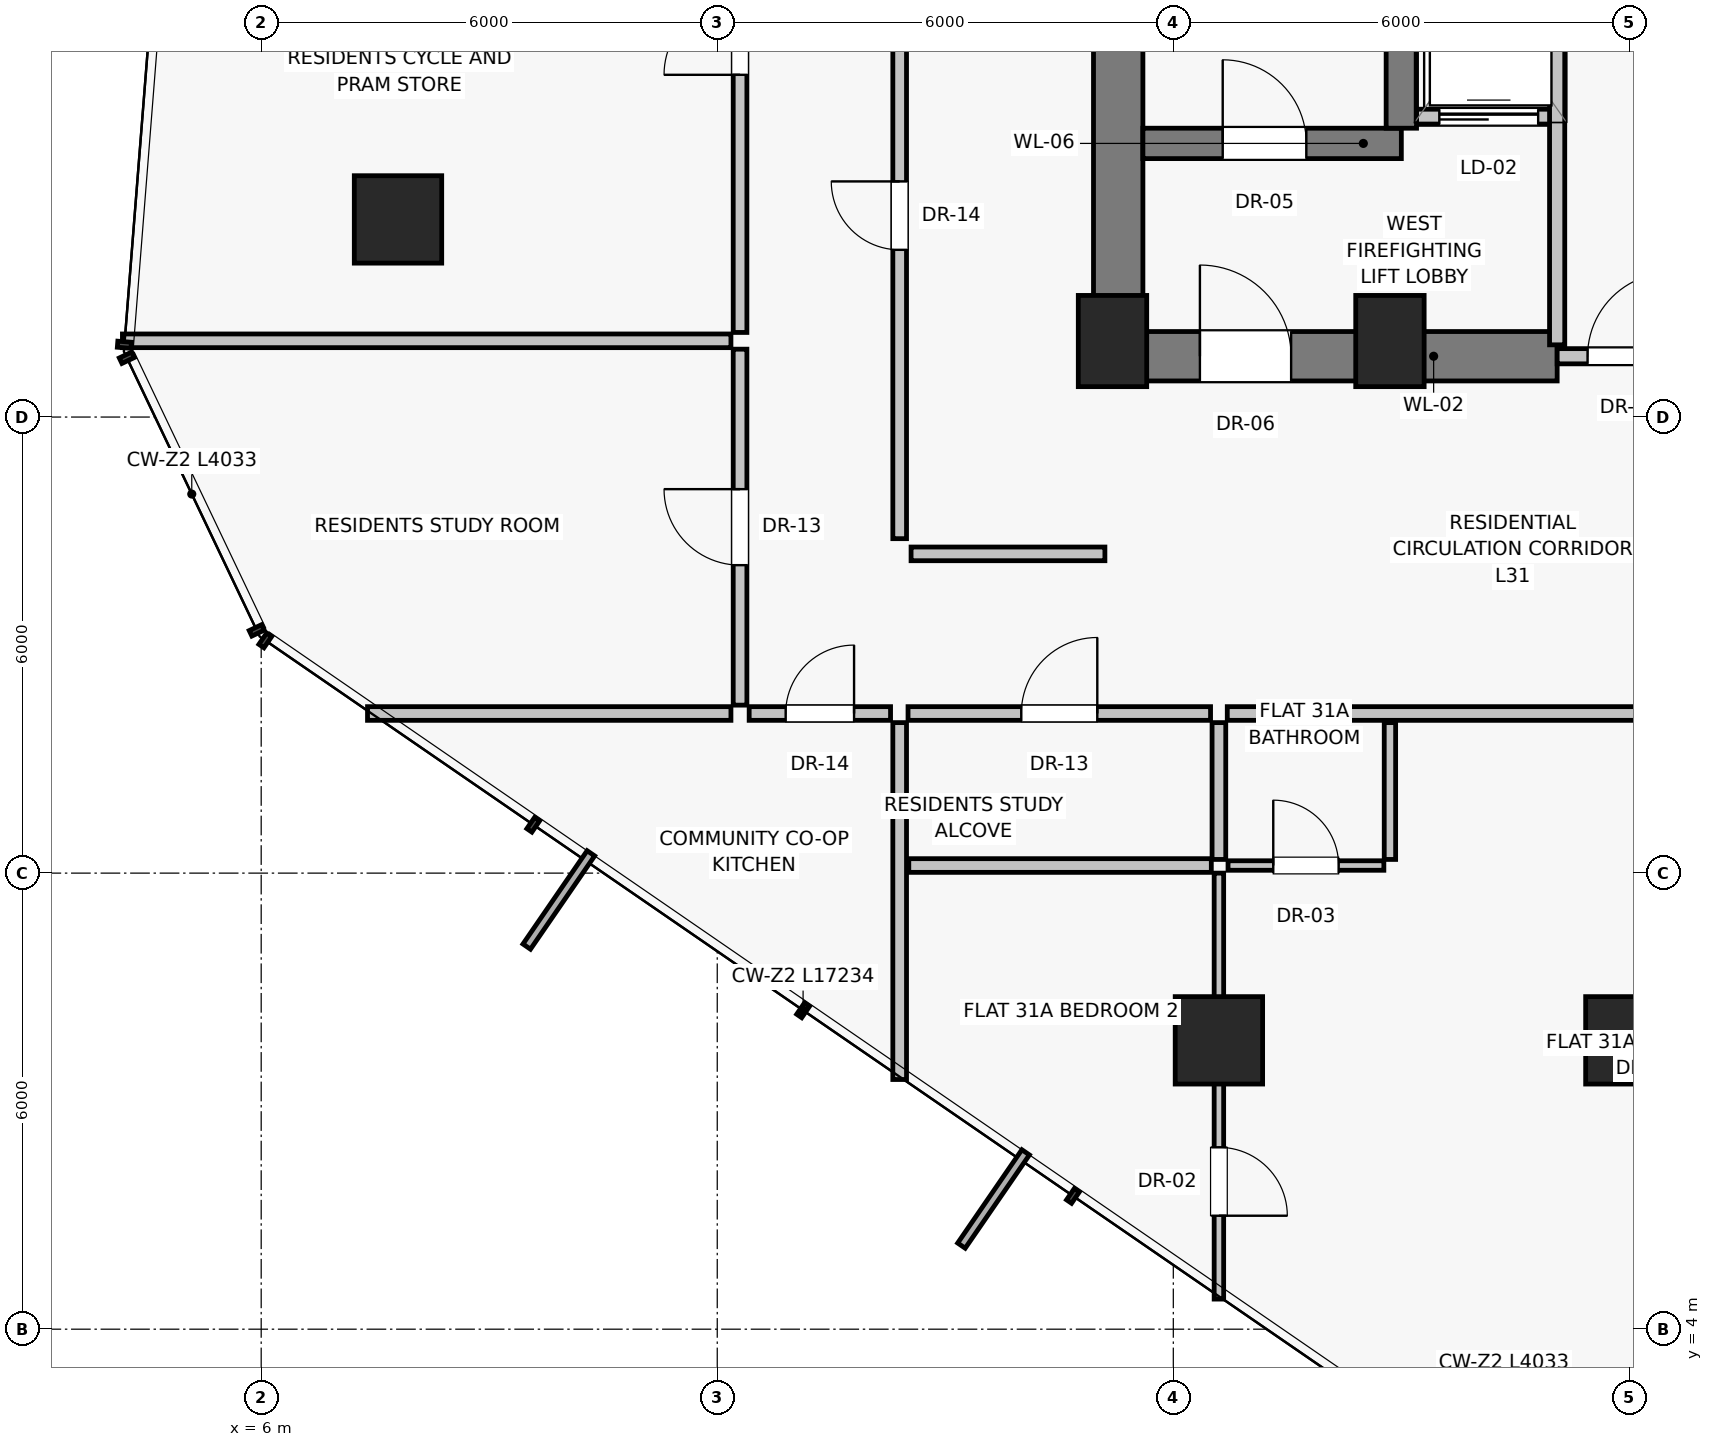
"""IFC4 building model, lengths in metres.
Left out: names, types, materials, properties, quantities, classifications, styles, units other than length and angle.
Written with IfcOpenShell. Run it as: python <this file> out.ifc"""

import sys

from ifc_helpers import new_model, si_unit, direction, frame, frame_2d, origin, origin_2d, place, context, subcontext, project, spatial, rectangle, extrude, source, transform, mapped, element, fill, save


model = new_model("IFC4")
c1 = context("Model", 3, precision=1e-05, world=origin(), true_north=direction((0.0, 1.0)))
c2 = subcontext(c1, "Body", "Model", "MODEL_VIEW")
j1 = project(units=[si_unit("LENGTHUNIT", "METRE"), si_unit("PLANEANGLEUNIT", "RADIAN")], contexts=[c1])
p1 = place(None, origin())
s1 = spatial("IfcSite", under=j1, at=p1, CompositionType="ELEMENT")
p2 = place(p1, origin())
s2 = spatial("IfcBuilding", under=s1, at=p2, CompositionType="ELEMENT")
p3 = place(p2, frame((0.0, 0.0, 113.25)))
s3 = spatial("IfcBuildingStorey", under=s2, at=p3, CompositionType="ELEMENT", Elevation=113.25)
for number, where, z_axis, x_axis in (
    (1, (17.2, 17.0, 0.0), (0.0, 0.0, 1.0), (1.0, 0.0, 0.0)),
    (2, (20.85, 17.0, 0.0), (0.0, 0.0, 1.0), (1.0, 0.0, 0.0)),
):
    element("IfcColumn", number, at=place(p3, frame(where, z_axis=z_axis, x_axis=x_axis)), inside=s3, PredefinedType="PILASTER", context=c2, shape_type="SweptSolid", body=[
        extrude(rectangle(XDim=0.9, YDim=1.2, at=origin_2d()), origin(), (0.0, 0.0, 1.0), 3.25),
    ])
for number, where, z_axis, x_axis in (
    (3, (7.8, 18.6, 0.0), (0.0, 0.0, 1.0), (1.0, 0.0, 0.0)),
    (4, (18.6, 7.8, 0.0), (0.0, 0.0, 1.0), (1.0, 0.0, 0.0)),
    (5, (24.0, 7.8, 0.0), (0.0, 0.0, 1.0), (1.0, 0.0, 0.0)),
):
    element("IfcColumn", number, at=place(p3, frame(where, z_axis=z_axis, x_axis=x_axis)), inside=s3, PredefinedType="COLUMN", context=c2, shape_type="SweptSolid", body=[
        extrude(rectangle(XDim=1.15, YDim=1.15, at=origin_2d()), origin(), (0.0, 0.0, 1.0), 3.25),
    ])
p4 = place(p3, frame((17.275, 16.8, 0.0), z_axis=(0.0, 0.0, 1.0), x_axis=(0.0, 1.0, 0.0)))
e6 = element("IfcWall", 6, at=p4, inside=s3, PredefinedType="SHEAR", context=c2, shape_type="SweptSolid", body=[
    extrude(rectangle(XDim=14.2, YDim=0.65, at=frame_2d((7.1, 0.0))), origin(), (0.0, 0.0, 1.0), 3.0),
])
p5 = place(p3, frame((17.2, 16.8, 0.0), z_axis=(0.0, 0.0, 1.0), x_axis=(1.0, 0.0, 0.0)))
e7 = element("IfcWall", 7, at=p5, inside=s3, PredefinedType="SHEAR", context=c2, shape_type="SweptSolid", body=[
    extrude(rectangle(XDim=5.85, YDim=0.65, at=frame_2d((2.925, 0.0))), origin(), (0.0, 0.0, 1.0), 3.0),
])
p6 = place(p5, frame((1.15, 0.0, 0.0)))
e8 = element("IfcOpeningElement", 8, at=p6, cuts=e7, PredefinedType="OPENING", context=c2, shape_type="SweptSolid", body=[
    extrude(rectangle(XDim=1.2, YDim=2.03, at=frame_2d((0.6, 1.015))), frame((0.0, 0.335, 0.0), z_axis=(0.0, -1.0, 0.0), x_axis=(1.0, 0.0, 0.0)), (0.0, 0.0, 1.0), 0.67),
])
p7 = place(p3, frame((23.05, 16.8, 0.0), z_axis=(0.0, 0.0, 1.0), x_axis=(1.0, 0.0, 0.0)))
e9 = element("IfcWall", 9, at=p7, inside=s3, PredefinedType="SOLIDWALL", context=c2, shape_type="SweptSolid", body=[
    extrude(rectangle(XDim=1.9, YDim=0.2, at=frame_2d((0.95, 0.0))), origin(), (0.0, 0.0, 1.0), 2.15),
])
p8 = place(p7, frame((0.4, 0.0, 0.0)))
e10 = element("IfcOpeningElement", 10, at=p8, cuts=e9, PredefinedType="OPENING", context=c2, shape_type="SweptSolid", body=[
    extrude(rectangle(XDim=1.1, YDim=2.03, at=frame_2d((0.55, 1.015))), frame((0.0, 0.11, 0.0), z_axis=(0.0, -1.0, 0.0), x_axis=(1.0, 0.0, 0.0)), (0.0, 0.0, 1.0), 0.22),
])
p9 = place(p3, frame((17.6, 19.6, 0.0), z_axis=(0.0, 0.0, 1.0), x_axis=(1.0, 0.0, 0.0)))
e11 = element("IfcWall", 11, at=p9, inside=s3, PredefinedType="SHEAR", context=c2, shape_type="SweptSolid", body=[
    extrude(rectangle(XDim=3.4, YDim=0.4, at=frame_2d((1.7, 0.0))), origin(), (0.0, 0.0, 1.0), 3.0),
])
p10 = place(p9, frame((1.05, 0.0, 0.0)))
e12 = element("IfcOpeningElement", 12, at=p10, cuts=e11, PredefinedType="OPENING", context=c2, shape_type="SweptSolid", body=[
    extrude(rectangle(XDim=1.1, YDim=2.03, at=frame_2d((0.55, 1.015))), frame((0.0, 0.21, 0.0), z_axis=(0.0, -1.0, 0.0), x_axis=(1.0, 0.0, 0.0)), (0.0, 0.0, 1.0), 0.42),
])
p11 = place(p3, frame((21.2, 19.95, 0.0), z_axis=(0.0, 0.0, 1.0), x_axis=(1.0, 0.0, 0.0)))
e13 = element("IfcWall", 13, at=p11, inside=s3, PredefinedType="SOLIDWALL", context=c2, shape_type="SweptSolid", body=[
    extrude(rectangle(XDim=1.85, YDim=0.2, at=frame_2d((0.925, 0.0))), origin(), (0.0, 0.0, 1.0), 3.0),
])
p12 = place(p11, frame((0.3, 0.0, 0.0)))
e14 = element("IfcOpeningElement", 14, at=p12, cuts=e13, PredefinedType="OPENING", context=c2, shape_type="SweptSolid", body=[
    extrude(rectangle(XDim=1.3, YDim=2.25, at=frame_2d((0.65, 1.125))), frame((0.0, 0.11, 0.0), z_axis=(0.0, -1.0, 0.0), x_axis=(1.0, 0.0, 0.0)), (0.0, 0.0, 1.0), 0.22),
])
p13 = place(p3, frame((21.0, 19.8, 0.0), z_axis=(0.0, 0.0, 1.0), x_axis=(0.0, 1.0, 0.0)))
e15 = element("IfcWall", 15, at=p13, inside=s3, PredefinedType="SHEAR", context=c2, shape_type="SweptSolid", body=[
    extrude(rectangle(XDim=8.8, YDim=0.4, at=frame_2d((4.4, 0.0))), origin(), (0.0, 0.0, 1.0), 3.0),
])
p14 = place(p3, frame((23.05, 16.95, 0.0), z_axis=(0.0, 0.0, 1.0), x_axis=(0.0, 1.0, 0.0)))
e16 = element("IfcWall", 16, at=p14, inside=s3, PredefinedType="SOLIDWALL", context=c2, shape_type="SweptSolid", body=[
    extrude(rectangle(XDim=5.6, YDim=0.2, at=frame_2d((2.8, 0.0))), origin(), (0.0, 0.0, 1.0), 3.0),
])
p15 = place(p3, frame((14.4, 14.4, 0.0), z_axis=(0.0, 0.0, 1.0), x_axis=(0.0, 1.0, 0.0)))
e17 = element("IfcWall", 17, at=p15, inside=s3, PredefinedType="PARTITIONING", context=c2, shape_type="SweptSolid", body=[
    extrude(rectangle(XDim=9.4, YDim=0.18, at=frame_2d((4.7, 0.0))), origin(), (0.0, 0.0, 1.0), 3.0),
])
p16 = place(p15, frame((3.8, 0.0, 0.0)))
e18 = element("IfcOpeningElement", 18, at=p16, cuts=e17, PredefinedType="OPENING", context=c2, shape_type="SweptSolid", body=[
    extrude(rectangle(XDim=0.9, YDim=2.01, at=frame_2d((0.45, 1.005))), frame((0.0, 0.1, 0.0), z_axis=(0.0, -1.0, 0.0), x_axis=(1.0, 0.0, 0.0)), (0.0, 0.0, 1.0), 0.2),
])
p17 = place(p3, frame((14.55, 14.2, 0.0), z_axis=(0.0, 0.0, 1.0), x_axis=(1.0, 0.0, 0.0)))
e19 = element("IfcWall", 19, at=p17, inside=s3, PredefinedType="PARTITIONING", context=c2, shape_type="SweptSolid", body=[
    extrude(rectangle(XDim=2.55, YDim=0.18, at=frame_2d((1.275, 0.0))), origin(), (0.0, 0.0, 1.0), 3.0),
])
p18 = place(p3, frame((14.4, 11.98, 0.0), z_axis=(0.0, 0.0, 1.0), x_axis=(0.0, -1.0, 0.0)))
e20 = element("IfcWall", 20, at=p18, inside=s3, PredefinedType="PARTITIONING", context=c2, shape_type="SweptSolid", body=[
    extrude(rectangle(XDim=4.695, YDim=0.18, at=frame_2d((2.348, 0.0))), origin(), (0.0, 0.0, 1.0), 3.0),
])
p19 = place(p3, frame((14.51, 12.1, 0.0), z_axis=(0.0, 0.0, 1.0), x_axis=(1.0, 0.0, 0.0)))
e21 = element("IfcWall", 21, at=p19, inside=s3, PredefinedType="PARTITIONING", context=c2, shape_type="SweptSolid", body=[
    extrude(rectangle(XDim=3.98, YDim=0.18, at=frame_2d((1.99, 0.0))), origin(), (0.0, 0.0, 1.0), 2.58),
])
p20 = place(p19, frame((1.49, 0.0, 0.0)))
e22 = element("IfcOpeningElement", 22, at=p20, cuts=e21, PredefinedType="OPENING", context=c2, shape_type="SweptSolid", body=[
    extrude(rectangle(XDim=1.0, YDim=2.01, at=frame_2d((0.5, 1.005))), frame((0.0, 0.1, 0.0), z_axis=(0.0, -1.0, 0.0), x_axis=(1.0, 0.0, 0.0)), (0.0, 0.0, 1.0), 0.2),
])
p21 = place(p3, frame((18.71, 12.1, 0.0), z_axis=(0.0, 0.0, 1.0), x_axis=(1.0, 0.0, 0.0)))
e23 = element("IfcWall", 23, at=p21, inside=s3, PredefinedType="PARTITIONING", context=c2, shape_type="SweptSolid", body=[
    extrude(rectangle(XDim=14.78, YDim=0.18, at=frame_2d((7.39, 0.0))), origin(), (0.0, 0.0, 1.0), 2.58),
])
p22 = place(p21, frame((5.94, 0.0, 0.0)))
e24 = element("IfcOpeningElement", 24, at=p22, cuts=e23, PredefinedType="OPENING", context=c2, shape_type="SweptSolid", body=[
    extrude(rectangle(XDim=0.95, YDim=2.02, at=frame_2d((0.475, 1.01))), frame((0.0, 0.1, 0.0), z_axis=(0.0, -1.0, 0.0), x_axis=(1.0, 0.0, 0.0)), (0.0, 0.0, 1.0), 0.2),
])
p23 = place(p3, frame((14.52, 10.1, 0.0), z_axis=(0.0, 0.0, 1.0), x_axis=(1.0, 0.0, 0.0)))
e25 = element("IfcWall", 25, at=p23, inside=s3, PredefinedType="PARTITIONING", context=c2, shape_type="SweptSolid", body=[
    extrude(rectangle(XDim=3.98, YDim=0.18, at=frame_2d((1.99, 0.0))), origin(), (0.0, 0.0, 1.0), 3.0),
])
p24 = place(p3, frame((18.6, 11.98, 0.0), z_axis=(0.0, 0.0, 1.0), x_axis=(0.0, -1.0, 0.0)))
e26 = element("IfcWall", 26, at=p24, inside=s3, PredefinedType="PARTITIONING", context=c2, shape_type="SweptSolid", body=[
    extrude(rectangle(XDim=1.8, YDim=0.18, at=frame_2d((0.9, 0.0))), origin(), (0.0, 0.0, 1.0), 2.378),
])
p25 = place(p3, frame((18.6, 10.0, 0.0), z_axis=(0.0, 0.0, 1.0), x_axis=(0.0, -1.0, 0.0)))
e27 = element("IfcWall", 27, at=p25, inside=s3, PredefinedType="PARTITIONING", context=c2, shape_type="SweptSolid", body=[
    extrude(rectangle(XDim=5.604, YDim=0.125, at=frame_2d((2.802, 0.0))), origin(), (0.0, 0.0, 1.0), 2.378),
])
p26 = place(p25, frame((3.607, 0.0, 0.0)))
e28 = element("IfcOpeningElement", 28, at=p26, cuts=e27, PredefinedType="OPENING", context=c2, shape_type="SweptSolid", body=[
    extrude(rectangle(XDim=0.9, YDim=2.01, at=frame_2d((0.45, 1.005))), frame((0.0, 0.073, 0.0), z_axis=(0.0, -1.0, 0.0), x_axis=(1.0, 0.0, 0.0)), (0.0, 0.0, 1.0), 0.145),
])
p27 = place(p3, frame((20.85, 11.98, 0.0), z_axis=(0.0, 0.0, 1.0), x_axis=(0.0, -1.0, 0.0)))
e29 = element("IfcWall", 29, at=p27, inside=s3, PredefinedType="PARTITIONING", context=c2, shape_type="SweptSolid", body=[
    extrude(rectangle(XDim=1.8, YDim=0.15, at=frame_2d((0.9, 0.0))), origin(), (0.0, 0.0, 1.0), 3.0),
])
p28 = place(p3, frame((18.72, 10.1, 0.0), z_axis=(0.0, 0.0, 1.0), x_axis=(1.0, 0.0, 0.0)))
e30 = element("IfcWall", 30, at=p28, inside=s3, PredefinedType="PARTITIONING", context=c2, shape_type="SweptSolid", body=[
    extrude(rectangle(XDim=2.05, YDim=0.125, at=frame_2d((1.025, 0.0))), origin(), (0.0, 0.0, 1.0), 3.0),
])
p29 = place(p28, frame((0.595, 0.0, 0.0)))
e31 = element("IfcOpeningElement", 31, at=p29, cuts=e30, PredefinedType="OPENING", context=c2, shape_type="SweptSolid", body=[
    extrude(rectangle(XDim=0.86, YDim=2.01, at=frame_2d((0.43, 1.005))), frame((0.0, 0.073, 0.0), z_axis=(0.0, -1.0, 0.0), x_axis=(1.0, 0.0, 0.0)), (0.0, 0.0, 1.0), 0.145),
])
p30 = place(p3, frame((12.18, 12.1, 0.0), z_axis=(0.0, 0.0, 1.0), x_axis=(-1.0, 0.0, 0.0)))
e32 = element("IfcWall", 32, at=p30, inside=s3, PredefinedType="PARTITIONING", context=c2, shape_type="SweptSolid", body=[
    extrude(rectangle(XDim=4.781, YDim=0.18, at=frame_2d((2.391, 0.0))), origin(), (0.0, 0.0, 1.0), 3.0),
])
p31 = place(p3, frame((12.3, 12.21, 0.0), z_axis=(0.0, 0.0, 1.0), x_axis=(0.0, 1.0, 0.0)))
e33 = element("IfcWall", 33, at=p31, inside=s3, PredefinedType="PARTITIONING", context=c2, shape_type="SweptSolid", body=[
    extrude(rectangle(XDim=4.683, YDim=0.18, at=frame_2d((2.342, 0.0))), origin(), (0.0, 0.0, 1.0), 3.0),
])
p32 = place(p31, frame((1.842, 0.0, 0.0)))
e34 = element("IfcOpeningElement", 34, at=p32, cuts=e33, PredefinedType="OPENING", context=c2, shape_type="SweptSolid", body=[
    extrude(rectangle(XDim=1.0, YDim=2.01, at=frame_2d((0.5, 1.005))), frame((0.0, 0.1, 0.0), z_axis=(0.0, -1.0, 0.0), x_axis=(1.0, 0.0, 0.0)), (0.0, 0.0, 1.0), 0.2),
])
p33 = place(p3, frame((12.3, 17.113, 0.0), z_axis=(0.0, 0.0, 1.0), x_axis=(0.0, 1.0, 0.0)))
e35 = element("IfcWall", 35, at=p33, inside=s3, PredefinedType="PARTITIONING", context=c2, shape_type="SweptSolid", body=[
    extrude(rectangle(XDim=7.779, YDim=0.18, at=frame_2d((3.89, 0.0))), origin(), (0.0, 0.0, 1.0), 2.58),
])
p34 = place(p33, frame((3.389, 0.0, 0.0)))
e36 = element("IfcOpeningElement", 36, at=p34, cuts=e35, PredefinedType="OPENING", context=c2, shape_type="SweptSolid", body=[
    extrude(rectangle(XDim=1.0, YDim=2.01, at=frame_2d((0.5, 1.005))), frame((0.0, 0.1, 0.0), z_axis=(0.0, -1.0, 0.0), x_axis=(1.0, 0.0, 0.0)), (0.0, 0.0, 1.0), 0.2),
])
p35 = place(p3, frame((12.18, 17.003, 0.0), z_axis=(0.0, 0.0, 1.0), x_axis=(-1.0, 0.0, 0.0)))
e37 = element("IfcWall", 37, at=p35, inside=s3, PredefinedType="PARTITIONING", context=c2, shape_type="SweptSolid", body=[
    extrude(rectangle(XDim=8.005, YDim=0.18, at=frame_2d((4.003, 0.0))), origin(), (0.0, 0.0, 1.0), 3.0),
])
p36 = place(p3, frame((12.42, 12.1, 0.0), z_axis=(0.0, 0.0, 1.0), x_axis=(1.0, 0.0, 0.0)))
e38 = element("IfcWall", 38, at=p36, inside=s3, PredefinedType="PARTITIONING", context=c2, shape_type="SweptSolid", body=[
    extrude(rectangle(XDim=1.86, YDim=0.18, at=frame_2d((0.93, 0.0))), origin(), (0.0, 0.0, 1.0), 3.0),
])
p37 = place(p36, frame((0.48, 0.0, 0.0)))
e39 = element("IfcOpeningElement", 39, at=p37, cuts=e38, PredefinedType="OPENING", context=c2, shape_type="SweptSolid", body=[
    extrude(rectangle(XDim=0.9, YDim=2.01, at=frame_2d((0.45, 1.005))), frame((0.0, 0.1, 0.0), z_axis=(0.0, -1.0, 0.0), x_axis=(1.0, 0.0, 0.0)), (0.0, 0.0, 1.0), 0.2),
])
m1 = source(origin(), c2, "Body", "SweptSolid", [
    extrude(rectangle(XDim=1.2, YDim=2.03, at=frame_2d((0.6, 1.015))), frame((0.0, 0.025, 0.0), z_axis=(0.0, -1.0, 0.0), x_axis=(1.0, 0.0, 0.0)), (0.0, 0.0, 1.0), 0.05),
])
p38 = place(p6, origin())
e40 = element("IfcDoor", 40, at=p38, inside=s3, OperationType="SINGLE_SWING_LEFT", PredefinedType="DOOR", context=c2, shape_type="MappedRepresentation", body=[
    mapped(m1, transform((0.0, 0.0, 0.0), scale=1.0)),
])
fill(e8, e40)
m2 = source(origin(), c2, "Body", "SweptSolid", [
    extrude(rectangle(XDim=1.1, YDim=2.03, at=frame_2d((0.55, 1.015))), frame((0.0, 0.025, 0.0), z_axis=(0.0, -1.0, 0.0), x_axis=(1.0, 0.0, 0.0)), (0.0, 0.0, 1.0), 0.05),
])
p39 = place(p8, origin())
e41 = element("IfcDoor", 41, at=p39, inside=s3, OperationType="SINGLE_SWING_RIGHT", PredefinedType="DOOR", context=c2, shape_type="MappedRepresentation", body=[
    mapped(m2, transform((0.0, 0.0, 0.0), scale=1.0)),
])
fill(e10, e41)
p40 = place(p10, origin())
e42 = element("IfcDoor", 42, at=p40, inside=s3, OperationType="SINGLE_SWING_LEFT", PredefinedType="DOOR", context=c2, shape_type="MappedRepresentation", body=[
    mapped(m2, transform((0.0, 0.0, 0.0), scale=1.0)),
])
fill(e12, e42)
m3 = source(origin(), c2, "Body", "SweptSolid", [
    extrude(rectangle(XDim=1.3, YDim=2.25, at=frame_2d((0.65, 1.125))), frame((0.0, 0.025, 0.0), z_axis=(0.0, -1.0, 0.0), x_axis=(1.0, 0.0, 0.0)), (0.0, 0.0, 1.0), 0.05),
])
p41 = place(p12, origin())
e43 = element("IfcDoor", 43, at=p41, inside=s3, OperationType="SLIDING_TO_LEFT", PredefinedType="DOOR", context=c2, shape_type="MappedRepresentation", body=[
    mapped(m3, transform((0.0, 0.0, 0.0), scale=1.0)),
])
fill(e14, e43)
m4 = source(origin(), c2, "Body", "SweptSolid", [
    extrude(rectangle(XDim=0.9, YDim=2.01, at=frame_2d((0.45, 1.005))), frame((0.0, 0.025, 0.0), z_axis=(0.0, -1.0, 0.0), x_axis=(1.0, 0.0, 0.0)), (0.0, 0.0, 1.0), 0.05),
])
p42 = place(p16, origin())
e44 = element("IfcDoor", 44, at=p42, inside=s3, OperationType="SINGLE_SWING_RIGHT", PredefinedType="DOOR", context=c2, shape_type="MappedRepresentation", body=[
    mapped(m4, transform((0.0, 0.0, 0.0), scale=1.0)),
])
fill(e18, e44)
m5 = source(origin(), c2, "Body", "SweptSolid", [
    extrude(rectangle(XDim=1.0, YDim=2.01, at=frame_2d((0.5, 1.005))), frame((0.0, 0.025, 0.0), z_axis=(0.0, -1.0, 0.0), x_axis=(1.0, 0.0, 0.0)), (0.0, 0.0, 1.0), 0.05),
])
p43 = place(p20, origin())
e45 = element("IfcDoor", 45, at=p43, inside=s3, OperationType="SINGLE_SWING_RIGHT", PredefinedType="DOOR", context=c2, shape_type="MappedRepresentation", body=[
    mapped(m5, transform((0.0, 0.0, 0.0), scale=1.0)),
])
fill(e22, e45)
p44 = place(p26, origin())
e46 = element("IfcDoor", 46, at=p44, inside=s3, OperationType="SINGLE_SWING_RIGHT", PredefinedType="DOOR", context=c2, shape_type="MappedRepresentation", body=[
    mapped(m4, transform((0.0, 0.0, 0.0), scale=1.0)),
])
fill(e28, e46)
m6 = source(origin(), c2, "Body", "SweptSolid", [
    extrude(rectangle(XDim=0.86, YDim=2.01, at=frame_2d((0.43, 1.005))), frame((0.0, 0.025, 0.0), z_axis=(0.0, -1.0, 0.0), x_axis=(1.0, 0.0, 0.0)), (0.0, 0.0, 1.0), 0.05),
])
p45 = place(p29, origin())
e47 = element("IfcDoor", 47, at=p45, inside=s3, OperationType="SINGLE_SWING_LEFT", PredefinedType="DOOR", context=c2, shape_type="MappedRepresentation", body=[
    mapped(m6, transform((0.0, 0.0, 0.0), scale=1.0)),
])
fill(e31, e47)
p46 = place(p32, origin())
e48 = element("IfcDoor", 48, at=p46, inside=s3, OperationType="SINGLE_SWING_RIGHT", PredefinedType="DOOR", context=c2, shape_type="MappedRepresentation", body=[
    mapped(m5, transform((0.0, 0.0, 0.0), scale=1.0)),
])
fill(e34, e48)
p47 = place(p34, origin())
e49 = element("IfcDoor", 49, at=p47, inside=s3, OperationType="SINGLE_SWING_LEFT", PredefinedType="DOOR", context=c2, shape_type="MappedRepresentation", body=[
    mapped(m5, transform((0.0, 0.0, 0.0), scale=1.0)),
])
fill(e36, e49)
p48 = place(p37, origin())
e50 = element("IfcDoor", 50, at=p48, inside=s3, OperationType="SINGLE_SWING_RIGHT", PredefinedType="DOOR", context=c2, shape_type="MappedRepresentation", body=[
    mapped(m4, transform((0.0, 0.0, 0.0), scale=1.0)),
])
fill(e39, e50)
save(model, sys.argv[1])
